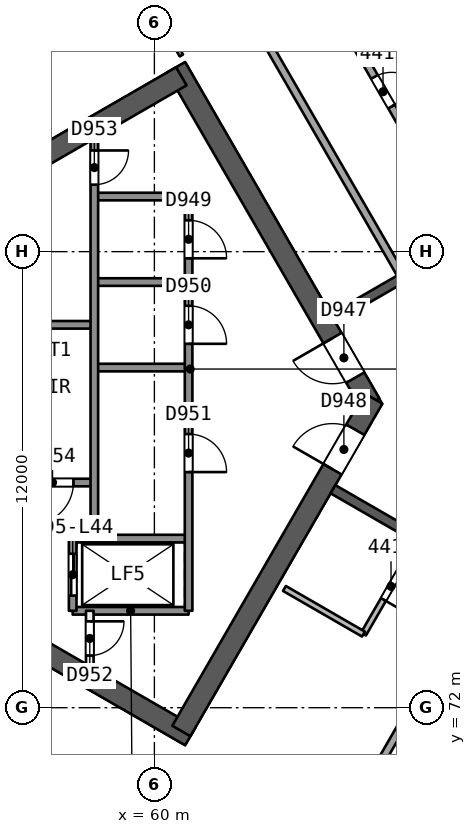
"""IFC4 building model, lengths in metres.
Left out: names, types, materials, properties, quantities, classifications, styles, units other than length and angle.
Written with IfcOpenShell. Run it as: python <this file> out.ifc"""

import sys

from ifc_helpers import new_model, si_unit, direction, frame, frame_2d, origin, place, context, subcontext, project, spatial, rectangle, extrude, element, fill, save


model = new_model("IFC4")
c1 = context("Model", 3, precision=1e-05, world=origin(), true_north=direction((0.0, 1.0)))
c2 = subcontext(c1, "Body", "Model", "MODEL_VIEW")
j1 = project(units=[si_unit("LENGTHUNIT", "METRE"), si_unit("PLANEANGLEUNIT", "RADIAN")], contexts=[c1])
p1 = place(None, origin())
s1 = spatial("IfcSite", under=j1, at=p1, CompositionType="ELEMENT")
p2 = place(p1, origin())
s2 = spatial("IfcBuilding", under=s1, at=p2, CompositionType="ELEMENT")
p3 = place(p2, frame((0.0, 0.0, 182.2)))
s3 = spatial("IfcBuildingStorey", under=s2, at=p3, CompositionType="ELEMENT", Elevation=182.2)
p4 = place(p3, frame((65.682, 80.0, 0.0), z_axis=(0.0, 0.0, 1.0), x_axis=(-0.500000202252, 0.866025287014, 0.0)))
e1 = element("IfcWall", 1, at=p4, inside=s3, PredefinedType="SHEAR", context=c2, shape_type="SweptSolid", body=[
    extrude(rectangle(XDim=10.221, YDim=0.55, at=frame_2d((5.111, 0.0))), origin(), (0.0, 0.0, 1.0), 3.7),
])
p5 = place(p4, frame((0.791, 0.0, 0.0)))
e2 = element("IfcOpeningElement", 2, at=p5, cuts=e1, PredefinedType="OPENING", context=c2, shape_type="SweptSolid", body=[
    extrude(rectangle(XDim=1.2, YDim=2.1, at=frame_2d((0.6, 1.05))), frame((0.0, 0.286, 0.0), z_axis=(0.0, -1.0, 0.0), x_axis=(1.0, 0.0, 0.0)), (0.0, 0.0, 1.0), 0.571),
])
p6 = place(p3, frame((60.709, 88.614, 0.0), z_axis=(0.0, 0.0, 1.0), x_axis=(-0.866020164116, -0.500009075263, 0.0)))
e3 = element("IfcWall", 3, at=p6, inside=s3, PredefinedType="SHEAR", context=c2, shape_type="SweptSolid", body=[
    extrude(rectangle(XDim=14.058, YDim=0.55, at=frame_2d((7.029, 0.0))), origin(), (0.0, 0.0, 1.0), 3.7),
])
p7 = place(p3, frame((48.672, 78.336, 0.0), z_axis=(0.0, 0.0, 1.0), x_axis=(0.866023530946, -0.500003243837, 0.0)))
e4 = element("IfcWall", 4, at=p7, inside=s3, PredefinedType="SHEAR", context=c2, shape_type="SweptSolid", body=[
    extrude(rectangle(XDim=14.175, YDim=0.55, at=frame_2d((7.087, 0.0))), origin(), (0.0, 0.0, 1.0), 3.7),
])
p8 = place(p3, frame((60.709, 71.386, 0.0), z_axis=(0.0, 0.0, 1.0), x_axis=(0.500015938302, 0.866016201606, 0.0)))
e5 = element("IfcWall", 5, at=p8, inside=s3, PredefinedType="SHEAR", context=c2, shape_type="SweptSolid", body=[
    extrude(rectangle(XDim=10.105, YDim=0.55, at=frame_2d((5.053, 0.0))), origin(), (0.0, 0.0, 1.0), 3.7),
])
p9 = place(p8, frame((7.955, 0.0, 0.0)))
e6 = element("IfcOpeningElement", 6, at=p9, cuts=e5, PredefinedType="OPENING", context=c2, shape_type="SweptSolid", body=[
    extrude(rectangle(XDim=1.2, YDim=2.1, at=frame_2d((0.6, 1.05))), frame((0.0, 0.286, 0.0), z_axis=(0.0, -1.0, 0.0), x_axis=(1.0, 0.0, 0.0)), (0.0, 0.0, 1.0), 0.571),
])
p10 = place(p3, frame((78.2, 90.046, 0.0), z_axis=(0.0, 0.0, 1.0), x_axis=(-0.866026492143, -0.499998114903, 0.0)))
e7 = element("IfcWall", 7, at=p10, inside=s3, PredefinedType="SHEAR", context=c2, shape_type="SweptSolid", body=[
    extrude(rectangle(XDim=15.588, YDim=0.25, at=frame_2d((7.794, 0.0))), origin(), (0.0, 0.0, 1.0), 3.25),
])
p11 = place(p10, frame((3.138, 0.0, 0.0)))
e8 = element("IfcOpeningElement", 8, at=p11, cuts=e7, PredefinedType="OPENING", context=c2, shape_type="SweptSolid", body=[
    extrude(rectangle(XDim=1.0, YDim=2.1, at=frame_2d((0.5, 1.05))), frame((0.0, 0.135, 0.0), z_axis=(0.0, -1.0, 0.0), x_axis=(1.0, 0.0, 0.0)), (0.0, 0.0, 1.0), 0.271),
])
p12 = place(p10, frame((6.415, 0.0, 0.0)))
e9 = element("IfcOpeningElement", 9, at=p12, cuts=e7, PredefinedType="OPENING", context=c2, shape_type="SweptSolid", body=[
    extrude(rectangle(XDim=1.2, YDim=2.4, at=frame_2d((0.6, 1.2))), frame((0.0, 0.135, 0.0), z_axis=(0.0, -1.0, 0.0), x_axis=(1.0, 0.0, 0.0)), (0.0, 0.0, 1.0), 0.271),
])
p13 = place(p10, frame((11.971, 0.0, 0.0)))
e10 = element("IfcOpeningElement", 10, at=p13, cuts=e7, PredefinedType="OPENING", context=c2, shape_type="SweptSolid", body=[
    extrude(rectangle(XDim=1.0, YDim=2.1, at=frame_2d((0.5, 1.05))), frame((0.0, 0.135, 0.0), z_axis=(0.0, -1.0, 0.0), x_axis=(1.0, 0.0, 0.0)), (0.0, 0.0, 1.0), 0.271),
])
p14 = place(p3, frame((64.7, 77.748, 0.0), z_axis=(0.0, 0.0, 1.0), x_axis=(0.866026492143, -0.499998114903, 0.0)))
e11 = element("IfcWall", 11, at=p14, inside=s3, PredefinedType="SHEAR", context=c2, shape_type="SweptSolid", body=[
    extrude(rectangle(XDim=15.588, YDim=0.25, at=frame_2d((7.794, 0.0))), origin(), (0.0, 0.0, 1.0), 3.25),
])
p15 = place(p14, frame((3.138, 0.0, 0.0)))
e12 = element("IfcOpeningElement", 12, at=p15, cuts=e11, PredefinedType="OPENING", context=c2, shape_type="SweptSolid", body=[
    extrude(rectangle(XDim=1.0, YDim=2.1, at=frame_2d((0.5, 1.05))), frame((0.0, 0.135, 0.0), z_axis=(0.0, -1.0, 0.0), x_axis=(1.0, 0.0, 0.0)), (0.0, 0.0, 1.0), 0.271),
])
p16 = place(p14, frame((6.175, 0.0, 0.0)))
e13 = element("IfcOpeningElement", 13, at=p16, cuts=e11, PredefinedType="OPENING", context=c2, shape_type="SweptSolid", body=[
    extrude(rectangle(XDim=0.9, YDim=2.1, at=frame_2d((0.45, 1.05))), frame((0.0, 0.135, 0.0), z_axis=(0.0, -1.0, 0.0), x_axis=(1.0, 0.0, 0.0)), (0.0, 0.0, 1.0), 0.271),
])
p17 = place(p14, frame((10.072, 0.0, 0.0)))
e14 = element("IfcOpeningElement", 14, at=p17, cuts=e11, PredefinedType="OPENING", context=c2, shape_type="SweptSolid", body=[
    extrude(rectangle(XDim=0.9, YDim=2.1, at=frame_2d((0.45, 1.05))), frame((0.0, 0.135, 0.0), z_axis=(0.0, -1.0, 0.0), x_axis=(1.0, 0.0, 0.0)), (0.0, 0.0, 1.0), 0.271),
])
p18 = place(p14, frame((13.53, 0.0, 0.0)))
e15 = element("IfcOpeningElement", 15, at=p18, cuts=e11, PredefinedType="OPENING", context=c2, shape_type="SweptSolid", body=[
    extrude(rectangle(XDim=1.0, YDim=2.1, at=frame_2d((0.5, 1.05))), frame((0.0, 0.135, 0.0), z_axis=(0.0, -1.0, 0.0), x_axis=(1.0, 0.0, 0.0)), (0.0, 0.0, 1.0), 0.271),
])
p19 = place(p3, frame((64.511, 95.05, 0.0), z_axis=(0.0, 0.0, 1.0), x_axis=(0.499998478678, -0.866026282118, 0.0)))
e16 = element("IfcWall", 16, at=p19, inside=s3, PredefinedType="PARTITIONING", context=c2, shape_type="SweptSolid", body=[
    extrude(rectangle(XDim=11.178, YDim=0.2, at=frame_2d((5.589, 0.0))), origin(), (0.0, 0.0, 1.0), 3.25),
])
p20 = place(p3, frame((59.111, 91.932, 0.0), z_axis=(0.0, 0.0, 1.0), x_axis=(0.499980071345, -0.866036909293, 0.0)))
e17 = element("IfcWall", 17, at=p20, inside=s3, PredefinedType="PARTITIONING", context=c2, shape_type="SweptSolid", body=[
    extrude(rectangle(XDim=3.199, YDim=0.1, at=frame_2d((1.6, 0.0))), origin(), (0.0, 0.0, 1.0), 3.25),
])
p21 = place(p20, frame((1.15, 0.0, 0.0)))
e18 = element("IfcOpeningElement", 18, at=p21, cuts=e17, PredefinedType="OPENING", context=c2, shape_type="SweptSolid", body=[
    extrude(rectangle(XDim=0.9, YDim=2.1, at=frame_2d((0.45, 1.05))), frame((0.0, 0.061, 0.0), z_axis=(0.0, -1.0, 0.0), x_axis=(1.0, 0.0, 0.0)), (0.0, 0.0, 1.0), 0.121),
])
p22 = place(p3, frame((66.534, 83.311, 0.0), z_axis=(0.0, 0.0, 1.0), x_axis=(-0.5000018851, 0.866024315419, 0.0)))
e19 = element("IfcWall", 19, at=p22, inside=s3, PredefinedType="PARTITIONING", context=c2, shape_type="SweptSolid", body=[
    extrude(rectangle(XDim=9.0, YDim=0.2, at=frame_2d((4.5, 0.0))), origin(), (0.0, 0.0, 1.0), 3.25),
])
p23 = place(p3, frame((63.766, 92.105, 0.0), z_axis=(0.0, 0.0, 1.0), x_axis=(0.5000018851, -0.866024315419, 0.0)))
e20 = element("IfcWall", 20, at=p23, inside=s3, PredefinedType="PARTITIONING", context=c2, shape_type="SweptSolid", body=[
    extrude(rectangle(XDim=9.0, YDim=0.2, at=frame_2d((4.5, 0.0))), origin(), (0.0, 0.0, 1.0), 3.25),
])
p24 = place(p23, frame((4.05, 0.0, 0.0)))
e21 = element("IfcOpeningElement", 21, at=p24, cuts=e20, PredefinedType="OPENING", context=c2, shape_type="SweptSolid", body=[
    extrude(rectangle(XDim=0.9, YDim=2.1, at=frame_2d((0.45, 1.05))), frame((0.0, 0.11, 0.0), z_axis=(0.0, -1.0, 0.0), x_axis=(1.0, 0.0, 0.0)), (0.0, 0.0, 1.0), 0.221),
])
p25 = place(p3, frame((66.952, 76.448, 0.0), z_axis=(0.0, 0.0, 1.0), x_axis=(-0.499987231761, -0.866032775405, 0.0)))
e22 = element("IfcWall", 22, at=p25, inside=s3, PredefinedType="PARTITIONING", context=c2, shape_type="SweptSolid", body=[
    extrude(rectangle(XDim=2.9, YDim=0.15, at=frame_2d((1.45, 0.0))), origin(), (0.0, 0.0, 1.0), 3.25),
])
p26 = place(p25, frame((1.05, 0.0, 0.0)))
e23 = element("IfcOpeningElement", 23, at=p26, cuts=e22, PredefinedType="OPENING", context=c2, shape_type="SweptSolid", body=[
    extrude(rectangle(XDim=0.8, YDim=2.1, at=frame_2d((0.4, 1.05))), frame((0.0, 0.085, 0.0), z_axis=(0.0, -1.0, 0.0), x_axis=(1.0, 0.0, 0.0)), (0.0, 0.0, 1.0), 0.171),
])
p27 = place(p3, frame((65.502, 73.937, 0.0), z_axis=(0.0, 0.0, 1.0), x_axis=(-0.865994240961, 0.500053971709, 0.0)))
e24 = element("IfcWall", 24, at=p27, inside=s3, PredefinedType="PARTITIONING", context=c2, shape_type="SweptSolid", body=[
    extrude(rectangle(XDim=2.401, YDim=0.15, at=frame_2d((1.201, 0.0))), origin(), (0.0, 0.0, 1.0), 3.25),
])
p28 = place(p3, frame((63.161, 65.729, 0.0), z_axis=(0.0, 0.0, 1.0), x_axis=(0.499998478678, 0.866026282118, 0.0)))
e25 = element("IfcWall", 25, at=p28, inside=s3, PredefinedType="PARTITIONING", context=c2, shape_type="SweptSolid", body=[
    extrude(rectangle(XDim=11.178, YDim=0.2, at=frame_2d((5.589, 0.0))), origin(), (0.0, 0.0, 1.0), 3.25),
])
p29 = place(p3, frame((42.841, 82.711, 0.0), z_axis=(0.0, 0.0, 1.0), x_axis=(0.866024774967, 0.500001089142, 0.0)))
e26 = element("IfcWall", 26, at=p29, inside=s3, PredefinedType="SOLIDWALL", context=c2, shape_type="SweptSolid", body=[
    extrude(rectangle(XDim=52.991, YDim=0.3, at=frame_2d((26.496, 0.0))), origin(), (0.0, 0.0, 1.0), 3.25),
])
p30 = place(p29, frame((20.619, 0.0, 0.0)))
e27 = element("IfcOpeningElement", 27, at=p30, cuts=e26, PredefinedType="OPENING", context=c2, shape_type="SweptSolid", body=[
    extrude(rectangle(XDim=2.4, YDim=2.4, at=frame_2d((1.2, 1.2))), frame((0.0, 0.161, 0.0), z_axis=(0.0, -1.0, 0.0), x_axis=(1.0, 0.0, 0.0)), (0.0, 0.0, 1.0), 0.321),
])
p31 = place(p29, frame((9.392, 0.0, 0.0)))
e28 = element("IfcOpeningElement", 28, at=p31, cuts=e26, PredefinedType="OPENING", context=c2, shape_type="SweptSolid", body=[
    extrude(rectangle(XDim=2.4, YDim=2.4, at=frame_2d((1.2, 1.2))), frame((0.0, 0.161, 0.0), z_axis=(0.0, -1.0, 0.0), x_axis=(1.0, 0.0, 0.0)), (0.0, 0.0, 1.0), 0.321),
])
p32 = place(p29, frame((40.145, 0.0, 0.0)))
e29 = element("IfcOpeningElement", 29, at=p32, cuts=e26, PredefinedType="OPENING", context=c2, shape_type="SweptSolid", body=[
    extrude(rectangle(XDim=2.4, YDim=2.4, at=frame_2d((1.2, 1.2))), frame((0.0, 0.161, 0.0), z_axis=(0.0, -1.0, 0.0), x_axis=(1.0, 0.0, 0.0)), (0.0, 0.0, 1.0), 0.321),
])
p33 = place(p29, frame((26.375, 0.0, 0.9)))
e30 = element("IfcOpeningElement", 30, at=p33, cuts=e26, PredefinedType="OPENING", context=c2, shape_type="SweptSolid", body=[
    extrude(rectangle(XDim=1.8, YDim=1.5, at=frame_2d((0.9, 0.75))), frame((0.0, 0.161, 0.0), z_axis=(0.0, -1.0, 0.0), x_axis=(1.0, 0.0, 0.0)), (0.0, 0.0, 1.0), 0.321),
])
p34 = place(p3, frame((88.732, 50.794, 0.0), z_axis=(0.0, 0.0, 1.0), x_axis=(-0.866024774967, 0.500001089142, 0.0)))
e31 = element("IfcWall", 31, at=p34, inside=s3, PredefinedType="SOLIDWALL", context=c2, shape_type="SweptSolid", body=[
    extrude(rectangle(XDim=52.991, YDim=0.3, at=frame_2d((26.496, 0.0))), origin(), (0.0, 0.0, 1.0), 3.25),
])
p35 = place(p34, frame((19.06, 0.0, 0.0)))
e32 = element("IfcOpeningElement", 32, at=p35, cuts=e31, PredefinedType="OPENING", context=c2, shape_type="SweptSolid", body=[
    extrude(rectangle(XDim=2.4, YDim=2.4, at=frame_2d((1.2, 1.2))), frame((0.0, 0.161, 0.0), z_axis=(0.0, -1.0, 0.0), x_axis=(1.0, 0.0, 0.0)), (0.0, 0.0, 1.0), 0.321),
])
p36 = place(p34, frame((9.392, 0.0, 0.0)))
e33 = element("IfcOpeningElement", 33, at=p36, cuts=e31, PredefinedType="OPENING", context=c2, shape_type="SweptSolid", body=[
    extrude(rectangle(XDim=2.4, YDim=2.4, at=frame_2d((1.2, 1.2))), frame((0.0, 0.161, 0.0), z_axis=(0.0, -1.0, 0.0), x_axis=(1.0, 0.0, 0.0)), (0.0, 0.0, 1.0), 0.321),
])
p37 = place(p34, frame((40.145, 0.0, 0.0)))
e34 = element("IfcOpeningElement", 34, at=p37, cuts=e31, PredefinedType="OPENING", context=c2, shape_type="SweptSolid", body=[
    extrude(rectangle(XDim=2.4, YDim=2.4, at=frame_2d((1.2, 1.2))), frame((0.0, 0.161, 0.0), z_axis=(0.0, -1.0, 0.0), x_axis=(1.0, 0.0, 0.0)), (0.0, 0.0, 1.0), 0.321),
])
p38 = place(p34, frame((26.765, 0.0, 0.9)))
e35 = element("IfcOpeningElement", 35, at=p38, cuts=e31, PredefinedType="OPENING", context=c2, shape_type="SweptSolid", body=[
    extrude(rectangle(XDim=1.8, YDim=1.5, at=frame_2d((0.9, 0.75))), frame((0.0, 0.161, 0.0), z_axis=(0.0, -1.0, 0.0), x_axis=(1.0, 0.0, 0.0)), (0.0, 0.0, 1.0), 0.321),
])
p39 = place(p34, frame((22.867, 0.0, 0.9)))
e36 = element("IfcOpeningElement", 36, at=p39, cuts=e31, PredefinedType="OPENING", context=c2, shape_type="SweptSolid", body=[
    extrude(rectangle(XDim=1.8, YDim=1.5, at=frame_2d((0.9, 0.75))), frame((0.0, 0.161, 0.0), z_axis=(0.0, -1.0, 0.0), x_axis=(1.0, 0.0, 0.0)), (0.0, 0.0, 1.0), 0.321),
])
for number, where, z_axis, x_axis in (
    (37, (60.9, 85.45, 0.0), (0.0, 0.0, 1.0), (-1.0, 0.0, 0.0)),
    (38, (60.9, 83.2, 0.0), (0.0, 0.0, 1.0), (-1.0, 0.0, 0.0)),
):
    element("IfcWall", number, at=place(p3, frame(where, z_axis=z_axis, x_axis=x_axis)), inside=s3, PredefinedType="SOLIDWALL", context=c2, shape_type="SweptSolid", body=[
        extrude(rectangle(XDim=2.48, YDim=0.2, at=frame_2d((1.24, 0.0))), origin(), (0.0, 0.0, 1.0), 3.25),
    ])
p40 = place(p3, frame((58.42, 82.075, 0.0), z_axis=(0.0, 0.0, 1.0), x_axis=(-1.0, 0.0, 0.0)))
e39 = element("IfcWall", 39, at=p40, inside=s3, PredefinedType="SOLIDWALL", context=c2, shape_type="SweptSolid", body=[
    extrude(rectangle(XDim=7.7, YDim=0.2, at=frame_2d((3.85, 0.0))), origin(), (0.0, 0.0, 1.0), 3.25),
])
p41 = place(p3, frame((60.9, 80.95, 0.0), z_axis=(0.0, 0.0, 1.0), x_axis=(-1.0, 0.0, 0.0)))
e40 = element("IfcWall", 40, at=p41, inside=s3, PredefinedType="SOLIDWALL", context=c2, shape_type="SweptSolid", body=[
    extrude(rectangle(XDim=2.48, YDim=0.2, at=frame_2d((1.24, 0.0))), origin(), (0.0, 0.0, 1.0), 3.25),
])
p42 = place(p3, frame((58.42, 77.925, 0.0), z_axis=(0.0, 0.0, 1.0), x_axis=(-1.0, 0.0, 0.0)))
e41 = element("IfcWall", 41, at=p42, inside=s3, PredefinedType="SOLIDWALL", context=c2, shape_type="SweptSolid", body=[
    extrude(rectangle(XDim=7.7, YDim=0.2, at=frame_2d((3.85, 0.0))), origin(), (0.0, 0.0, 1.0), 3.25),
])
p43 = place(p42, frame((0.55, 0.0, 0.0)))
e42 = element("IfcOpeningElement", 42, at=p43, cuts=e41, PredefinedType="OPENING", context=c2, shape_type="SweptSolid", body=[
    extrude(rectangle(XDim=1.1, YDim=2.1, at=frame_2d((0.55, 1.05))), frame((0.0, 0.11, 0.0), z_axis=(0.0, -1.0, 0.0), x_axis=(1.0, 0.0, 0.0)), (0.0, 0.0, 1.0), 0.221),
])
for number, where, z_axis, x_axis in (
    (43, (60.9, 76.45, 0.0), (0.0, 0.0, 1.0), (-1.0, 0.0, 0.0)),
    (44, (60.9, 74.55, 0.0), (0.0, 0.0, 1.0), (-1.0, 0.0, 0.0)),
):
    element("IfcWall", number, at=place(p3, frame(where, z_axis=z_axis, x_axis=x_axis)), inside=s3, PredefinedType="SOLIDWALL", context=c2, shape_type="SweptSolid", body=[
        extrude(rectangle(XDim=3.05, YDim=0.2, at=frame_2d((1.525, 0.0))), origin(), (0.0, 0.0, 1.0), 3.25),
    ])
p44 = place(p3, frame((60.9, 85.45, 0.0), z_axis=(0.0, 0.0, 1.0), x_axis=(0.0, -1.0, 0.0)))
e45 = element("IfcWall", 45, at=p44, inside=s3, PredefinedType="SOLIDWALL", context=c2, shape_type="SweptSolid", body=[
    extrude(rectangle(XDim=10.9, YDim=0.2, at=frame_2d((5.45, 0.0))), origin(), (0.0, 0.0, 1.0), 3.25),
])
p45 = place(p44, frame((0.625, 0.0, 0.0)))
e46 = element("IfcOpeningElement", 46, at=p45, cuts=e45, PredefinedType="OPENING", context=c2, shape_type="SweptSolid", body=[
    extrude(rectangle(XDim=1.0, YDim=2.1, at=frame_2d((0.5, 1.05))), frame((0.0, 0.11, 0.0), z_axis=(0.0, -1.0, 0.0), x_axis=(1.0, 0.0, 0.0)), (0.0, 0.0, 1.0), 0.221),
])
p46 = place(p44, frame((2.875, 0.0, 0.0)))
e47 = element("IfcOpeningElement", 47, at=p46, cuts=e45, PredefinedType="OPENING", context=c2, shape_type="SweptSolid", body=[
    extrude(rectangle(XDim=1.0, YDim=2.1, at=frame_2d((0.5, 1.05))), frame((0.0, 0.11, 0.0), z_axis=(0.0, -1.0, 0.0), x_axis=(1.0, 0.0, 0.0)), (0.0, 0.0, 1.0), 0.221),
])
p47 = place(p44, frame((6.25, 0.0, 0.0)))
e48 = element("IfcOpeningElement", 48, at=p47, cuts=e45, PredefinedType="OPENING", context=c2, shape_type="SweptSolid", body=[
    extrude(rectangle(XDim=1.0, YDim=2.1, at=frame_2d((0.5, 1.05))), frame((0.0, 0.11, 0.0), z_axis=(0.0, -1.0, 0.0), x_axis=(1.0, 0.0, 0.0)), (0.0, 0.0, 1.0), 0.221),
])
p48 = place(p3, frame((58.42, 86.974, 0.0), z_axis=(0.0, 0.0, 1.0), x_axis=(0.0, -1.0, 0.0)))
e49 = element("IfcWall", 49, at=p48, inside=s3, PredefinedType="SOLIDWALL", context=c2, shape_type="SweptSolid", body=[
    extrude(rectangle(XDim=10.524, YDim=0.2, at=frame_2d((5.262, 0.0))), origin(), (0.0, 0.0, 1.0), 3.25),
])
p49 = place(p48, frame((0.312, 0.0, 0.0)))
e50 = element("IfcOpeningElement", 50, at=p49, cuts=e49, PredefinedType="OPENING", context=c2, shape_type="SweptSolid", body=[
    extrude(rectangle(XDim=0.9, YDim=2.1, at=frame_2d((0.45, 1.05))), frame((0.0, 0.11, 0.0), z_axis=(0.0, -1.0, 0.0), x_axis=(1.0, 0.0, 0.0)), (0.0, 0.0, 1.0), 0.221),
])
p50 = place(p3, frame((58.3, 74.55, 0.0), z_axis=(0.0, 0.0, 1.0), x_axis=(0.0, -1.0, 0.0)))
e51 = element("IfcWall", 51, at=p50, inside=s3, PredefinedType="PARTITIONING", context=c2, shape_type="SweptSolid", body=[
    extrude(rectangle(XDim=1.455, YDim=0.2, at=frame_2d((0.728, 0.0))), origin(), (0.0, 0.0, 1.0), 3.25),
])
p51 = place(p50, frame((0.278, 0.0, 0.0)))
e52 = element("IfcOpeningElement", 52, at=p51, cuts=e51, PredefinedType="OPENING", context=c2, shape_type="SweptSolid", body=[
    extrude(rectangle(XDim=0.9, YDim=2.1, at=frame_2d((0.45, 1.05))), frame((0.0, 0.11, 0.0), z_axis=(0.0, -1.0, 0.0), x_axis=(1.0, 0.0, 0.0)), (0.0, 0.0, 1.0), 0.221),
])
p52 = place(p3, frame((57.85, 76.45, 0.0), z_axis=(0.0, 0.0, 1.0), x_axis=(0.0, -1.0, 0.0)))
e53 = element("IfcWall", 53, at=p52, inside=s3, PredefinedType="SOLIDWALL", context=c2, shape_type="SweptSolid", body=[
    extrude(rectangle(XDim=1.9, YDim=0.2, at=frame_2d((0.95, 0.0))), origin(), (0.0, 0.0, 1.0), 3.25),
])
p53 = place(p52, frame((0.4, 0.0, 0.0)))
e54 = element("IfcOpeningElement", 54, at=p53, cuts=e53, PredefinedType="OPENING", context=c2, shape_type="SweptSolid", body=[
    extrude(rectangle(XDim=1.1, YDim=2.1, at=frame_2d((0.55, 1.05))), frame((0.0, 0.11, 0.0), z_axis=(0.0, -1.0, 0.0), x_axis=(1.0, 0.0, 0.0)), (0.0, 0.0, 1.0), 0.221),
])
p54 = place(p24, origin())
e55 = element("IfcDoor", 55, at=p54, inside=s3, OperationType="SINGLE_SWING_RIGHT", PredefinedType="NOTDEFINED", context=c2, shape_type="SweptSolid", body=[
    extrude(rectangle(XDim=0.9, YDim=2.1, at=frame_2d((0.45, 1.05))), frame((0.0, 0.025, 0.0), z_axis=(0.0, -1.0, 0.0), x_axis=(1.0, 0.0, 0.0)), (0.0, 0.0, 1.0), 0.05),
])
fill(e21, e55)
p55 = place(p26, origin())
e56 = element("IfcDoor", 56, at=p55, inside=s3, OperationType="SINGLE_SWING_RIGHT", PredefinedType="NOTDEFINED", context=c2, shape_type="SweptSolid", body=[
    extrude(rectangle(XDim=0.8, YDim=2.1, at=frame_2d((0.4, 1.05))), frame((0.0, 0.025, 0.0), z_axis=(0.0, -1.0, 0.0), x_axis=(1.0, 0.0, 0.0)), (0.0, 0.0, 1.0), 0.05),
])
fill(e23, e56)
p56 = place(p5, origin())
e57 = element("IfcDoor", 57, at=p56, inside=s3, OperationType="SINGLE_SWING_RIGHT", PredefinedType="NOTDEFINED", context=c2, shape_type="SweptSolid", body=[
    extrude(rectangle(XDim=1.2, YDim=2.1, at=frame_2d((0.6, 1.05))), frame((0.0, 0.025, 0.0), z_axis=(0.0, -1.0, 0.0), x_axis=(1.0, 0.0, 0.0)), (0.0, 0.0, 1.0), 0.05),
])
fill(e2, e57)
p57 = place(p9, origin())
e58 = element("IfcDoor", 58, at=p57, inside=s3, OperationType="SINGLE_SWING_LEFT", PredefinedType="NOTDEFINED", context=c2, shape_type="SweptSolid", body=[
    extrude(rectangle(XDim=1.2, YDim=2.1, at=frame_2d((0.6, 1.05))), frame((0.0, 0.025, 0.0), z_axis=(0.0, -1.0, 0.0), x_axis=(1.0, 0.0, 0.0)), (0.0, 0.0, 1.0), 0.05),
])
fill(e6, e58)
p58 = place(p53, origin())
e59 = element("IfcDoor", 59, at=p58, inside=s3, OperationType="SLIDING_TO_RIGHT", PredefinedType="NOTDEFINED", context=c2, shape_type="SweptSolid", body=[
    extrude(rectangle(XDim=1.1, YDim=2.1, at=frame_2d((0.55, 1.05))), frame((0.0, 0.025, 0.0), z_axis=(0.0, -1.0, 0.0), x_axis=(1.0, 0.0, 0.0)), (0.0, 0.0, 1.0), 0.05),
])
fill(e54, e59)
p59 = place(p45, origin())
e60 = element("IfcDoor", 60, at=p59, inside=s3, OperationType="SINGLE_SWING_RIGHT", PredefinedType="NOTDEFINED", context=c2, shape_type="SweptSolid", body=[
    extrude(rectangle(XDim=1.0, YDim=2.1, at=frame_2d((0.5, 1.05))), frame((0.0, 0.025, 0.0), z_axis=(0.0, -1.0, 0.0), x_axis=(1.0, 0.0, 0.0)), (0.0, 0.0, 1.0), 0.05),
])
fill(e46, e60)
p60 = place(p46, origin())
e61 = element("IfcDoor", 61, at=p60, inside=s3, OperationType="SINGLE_SWING_RIGHT", PredefinedType="NOTDEFINED", context=c2, shape_type="SweptSolid", body=[
    extrude(rectangle(XDim=1.0, YDim=2.1, at=frame_2d((0.5, 1.05))), frame((0.0, 0.025, 0.0), z_axis=(0.0, -1.0, 0.0), x_axis=(1.0, 0.0, 0.0)), (0.0, 0.0, 1.0), 0.05),
])
fill(e47, e61)
p61 = place(p47, origin())
e62 = element("IfcDoor", 62, at=p61, inside=s3, OperationType="SINGLE_SWING_RIGHT", PredefinedType="NOTDEFINED", context=c2, shape_type="SweptSolid", body=[
    extrude(rectangle(XDim=1.0, YDim=2.1, at=frame_2d((0.5, 1.05))), frame((0.0, 0.025, 0.0), z_axis=(0.0, -1.0, 0.0), x_axis=(1.0, 0.0, 0.0)), (0.0, 0.0, 1.0), 0.05),
])
fill(e48, e62)
p62 = place(p51, origin())
e63 = element("IfcDoor", 63, at=p62, inside=s3, OperationType="SINGLE_SWING_LEFT", PredefinedType="NOTDEFINED", context=c2, shape_type="SweptSolid", body=[
    extrude(rectangle(XDim=0.9, YDim=2.1, at=frame_2d((0.45, 1.05))), frame((0.0, 0.025, 0.0), z_axis=(0.0, -1.0, 0.0), x_axis=(1.0, 0.0, 0.0)), (0.0, 0.0, 1.0), 0.05),
])
fill(e52, e63)
p63 = place(p49, origin())
e64 = element("IfcDoor", 64, at=p63, inside=s3, OperationType="SINGLE_SWING_LEFT", PredefinedType="NOTDEFINED", context=c2, shape_type="SweptSolid", body=[
    extrude(rectangle(XDim=0.9, YDim=2.1, at=frame_2d((0.45, 1.05))), frame((0.0, 0.025, 0.0), z_axis=(0.0, -1.0, 0.0), x_axis=(1.0, 0.0, 0.0)), (0.0, 0.0, 1.0), 0.05),
])
fill(e50, e64)
p64 = place(p43, origin())
e65 = element("IfcDoor", 65, at=p64, inside=s3, OperationType="SINGLE_SWING_RIGHT", PredefinedType="NOTDEFINED", context=c2, shape_type="SweptSolid", body=[
    extrude(rectangle(XDim=1.1, YDim=2.1, at=frame_2d((0.55, 1.05))), frame((0.0, 0.025, 0.0), z_axis=(0.0, -1.0, 0.0), x_axis=(1.0, 0.0, 0.0)), (0.0, 0.0, 1.0), 0.05),
])
fill(e42, e65)
save(model, sys.argv[1])
